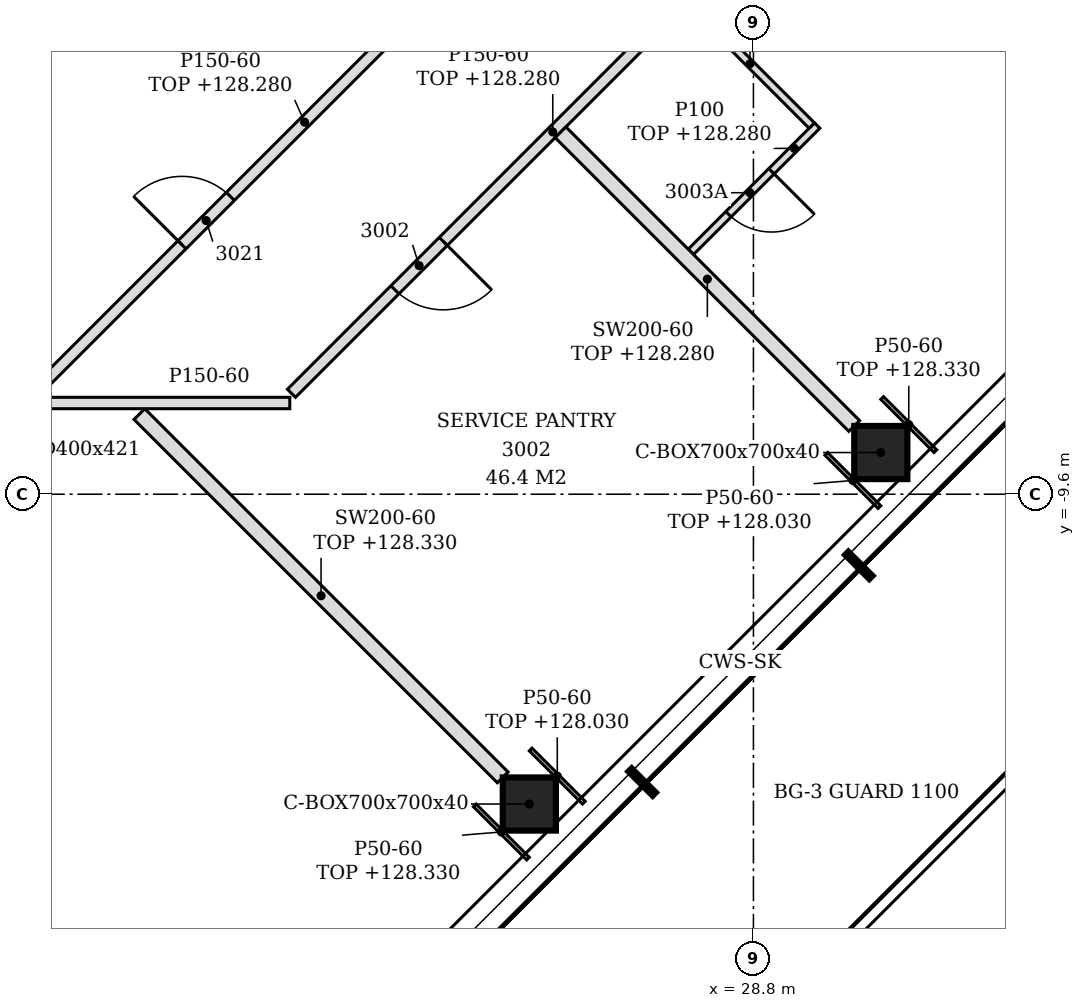
"""IFC4 building model, lengths in metres.
Left out: names, types, materials, properties, quantities, classifications, styles, units other than length and angle.
Written with IfcOpenShell. Run it as: python <this file> out.ifc"""

import sys

from ifc_helpers import new_model, si_unit, direction, frame, frame_2d, origin, origin_2d, place, context, subcontext, project, spatial, rectangle, hollow_rectangle, extrude, element, fill, save


model = new_model("IFC4")
c1 = context("Model", 3, precision=1e-05, world=origin(), true_north=direction((0.0, 1.0)))
c2 = subcontext(c1, "Body", "Model", "MODEL_VIEW")
j1 = project(units=[si_unit("LENGTHUNIT", "METRE"), si_unit("PLANEANGLEUNIT", "RADIAN")], contexts=[c1])
p1 = place(None, origin())
s1 = spatial("IfcSite", under=j1, at=p1, CompositionType="ELEMENT")
p2 = place(p1, origin())
s2 = spatial("IfcBuilding", under=s1, at=p2, CompositionType="ELEMENT")
p3 = place(p2, frame((0.0, 0.0, 125.4)))
s3 = spatial("IfcBuildingStorey", under=s2, at=p3, CompositionType="ELEMENT", Elevation=125.4)
for number, where, z_axis, x_axis in (
    (1, (25.852, -13.676, -0.15), (0.0, 0.0, 1.0), (1.0, 0.0, 0.0)),
    (2, (30.476, -9.052, -0.15), (0.0, 0.0, 1.0), (1.0, 0.0, 0.0)),
):
    element("IfcColumn", number, at=place(p3, frame(where, z_axis=z_axis, x_axis=x_axis)), inside=s3, PredefinedType="COLUMN", context=c2, shape_type="SweptSolid", body=[
        extrude(hollow_rectangle(XDim=0.7, YDim=0.7, WallThickness=0.04, at=origin_2d()), origin(), (0.0, 0.0, 1.0), 3.6),
    ])
p4 = place(p3, frame((25.502, -13.326, 0.0), z_axis=(0.0, 0.0, 1.0), x_axis=(-0.707106781187, 0.707106781187, 0.0)))
e3 = element("IfcWall", 3, at=p4, inside=s3, PredefinedType="PARTITIONING", context=c2, shape_type="SweptSolid", body=[
    extrude(rectangle(XDim=6.76, YDim=0.2, at=frame_2d((3.38, 0.0))), origin(), (0.0, 0.0, 1.0), 2.93),
])
p5 = place(p3, frame((30.125, -8.702, 0.0), z_axis=(0.0, 0.0, 1.0), x_axis=(-0.707084440093, 0.707129121574, 0.0)))
e4 = element("IfcWall", 4, at=p5, inside=s3, PredefinedType="PARTITIONING", context=c2, shape_type="SweptSolid", body=[
    extrude(rectangle(XDim=5.464, YDim=0.2, at=frame_2d((2.732, 0.0))), origin(), (0.0, 0.0, 1.0), 2.88),
])
p6 = place(p3, frame((19.405, -8.4, 0.0), z_axis=(0.0, 0.0, 1.0), x_axis=(1.0, 0.0, 0.0)))
e5 = element("IfcWall", 5, at=p6, inside=s3, PredefinedType="PARTITIONING", context=c2, shape_type="SweptSolid", body=[
    extrude(rectangle(XDim=3.295, YDim=0.15, at=frame_2d((1.648, 0.0))), origin(), (0.0, 0.0, 1.0), 3.45),
])
p7 = place(p3, frame((22.722, -8.272, 0.0), z_axis=(0.0, 0.0, 1.0), x_axis=(0.707124475887, 0.707089086043, 0.0)))
e6 = element("IfcWall", 6, at=p7, inside=s3, PredefinedType="PARTITIONING", context=c2, shape_type="SweptSolid", body=[
    extrude(rectangle(XDim=6.899, YDim=0.15, at=frame_2d((3.449, 0.0))), origin(), (0.0, 0.0, 1.0), 2.88),
])
p8 = place(p7, frame((1.925, 0.0, 0.0)))
e7 = element("IfcOpeningElement", 7, at=p8, cuts=e6, PredefinedType="OPENING", context=c2, shape_type="SweptSolid", body=[
    extrude(rectangle(XDim=0.9, YDim=2.1, at=frame_2d((0.45, 1.05))), frame((0.0, 0.085, 0.0), z_axis=(0.0, -1.0, 0.0), x_axis=(1.0, 0.0, 0.0)), (0.0, 0.0, 1.0), 0.17),
])
p9 = place(p3, frame((19.408, -8.191, 0.0), z_axis=(0.0, 0.0, 1.0), x_axis=(0.707126119272, 0.707087442572, 0.0)))
e8 = element("IfcWall", 8, at=p9, inside=s3, PredefinedType="PARTITIONING", context=c2, shape_type="SweptSolid", body=[
    extrude(rectangle(XDim=6.312, YDim=0.15, at=frame_2d((3.156, 0.0))), origin(), (0.0, 0.0, 1.0), 2.88),
])
p10 = place(p9, frame((2.649, 0.0, 0.0)))
e9 = element("IfcOpeningElement", 9, at=p10, cuts=e8, PredefinedType="OPENING", context=c2, shape_type="SweptSolid", body=[
    extrude(rectangle(XDim=0.9, YDim=2.1, at=frame_2d((0.45, 1.05))), frame((0.0, 0.085, 0.0), z_axis=(0.0, -1.0, 0.0), x_axis=(1.0, 0.0, 0.0)), (0.0, 0.0, 1.0), 0.17),
])
p11 = place(p3, frame((27.977, -6.411, 0.0), z_axis=(0.0, 0.0, 1.0), x_axis=(0.707054828152, 0.707158730404, 0.0)))
e10 = element("IfcWall", 10, at=p11, inside=s3, PredefinedType="PARTITIONING", context=c2, shape_type="SweptSolid", body=[
    extrude(rectangle(XDim=2.35, YDim=0.1, at=frame_2d((1.175, 0.0))), origin(), (0.0, 0.0, 1.0), 2.88),
])
p12 = place(p11, frame((0.7, 0.0, 0.0)))
e11 = element("IfcOpeningElement", 11, at=p12, cuts=e10, PredefinedType="OPENING", context=c2, shape_type="SweptSolid", body=[
    extrude(rectangle(XDim=0.8, YDim=2.1, at=frame_2d((0.4, 1.05))), frame((0.0, 0.06, 0.0), z_axis=(0.0, -1.0, 0.0), x_axis=(1.0, 0.0, 0.0)), (0.0, 0.0, 1.0), 0.12),
])
p13 = place(p3, frame((29.568, -4.75, 0.0), z_axis=(0.0, 0.0, 1.0), x_axis=(-0.707106781187, 0.707106781187, 0.0)))
e12 = element("IfcWall", 12, at=p13, inside=s3, PredefinedType="PARTITIONING", context=c2, shape_type="SweptSolid", body=[
    extrude(rectangle(XDim=2.3, YDim=0.1, at=frame_2d((1.15, 0.0))), origin(), (0.0, 0.0, 1.0), 2.88),
])
p14 = place(p3, frame((26.569, -13.658, 0.0), z_axis=(0.0, 0.0, 1.0), x_axis=(-0.707106781187, 0.707106781187, 0.0)))
e13 = element("IfcWall", 13, at=p14, inside=s3, PredefinedType="PARTITIONING", context=c2, shape_type="SweptSolid", body=[
    extrude(rectangle(XDim=0.99, YDim=0.05, at=frame_2d((0.495, 0.0))), origin(), (0.0, 0.0, 1.0), 2.63),
])
p15 = place(p3, frame((25.834, -14.393, 0.0), z_axis=(0.0, 0.0, 1.0), x_axis=(-0.707106781187, 0.707106781187, 0.0)))
e14 = element("IfcWall", 14, at=p15, inside=s3, PredefinedType="PARTITIONING", context=c2, shape_type="SweptSolid", body=[
    extrude(rectangle(XDim=0.99, YDim=0.05, at=frame_2d((0.495, 0.0))), origin(), (0.0, 0.0, 1.0), 2.93),
])
p16 = place(p3, frame((30.458, -9.769, 0.0), z_axis=(0.0, 0.0, 1.0), x_axis=(-0.706983473703, 0.707230067171, 0.0)))
e15 = element("IfcWall", 15, at=p16, inside=s3, PredefinedType="PARTITIONING", context=c2, shape_type="SweptSolid", body=[
    extrude(rectangle(XDim=0.99, YDim=0.05, at=frame_2d((0.495, 0.0))), origin(), (0.0, 0.0, 1.0), 2.63),
])
p17 = place(p3, frame((31.193, -9.034, 0.0), z_axis=(0.0, 0.0, 1.0), x_axis=(-0.707106781187, 0.707106781187, 0.0)))
e16 = element("IfcWall", 16, at=p17, inside=s3, PredefinedType="PARTITIONING", context=c2, shape_type="SweptSolid", body=[
    extrude(rectangle(XDim=0.99, YDim=0.05, at=frame_2d((0.495, 0.0))), origin(), (0.0, 0.0, 1.0), 2.93),
])
p18 = place(p8, frame((0.9, 0.0, 0.0), z_axis=(0.0, 0.0, 1.0), x_axis=(-1.0, 0.0, 0.0)))
e17 = element("IfcDoor", 17, at=p18, inside=s3, OperationType="SINGLE_SWING_LEFT", PredefinedType="DOOR", context=c2, shape_type="SweptSolid", body=[
    extrude(rectangle(XDim=0.9, YDim=2.1, at=frame_2d((0.45, 1.05))), frame((0.0, 0.025, 0.0), z_axis=(0.0, -1.0, 0.0), x_axis=(1.0, 0.0, 0.0)), (0.0, 0.0, 1.0), 0.05),
])
fill(e7, e17)
p19 = place(p12, frame((0.8, 0.0, 0.0), z_axis=(0.0, 0.0, 1.0), x_axis=(-1.0, 0.0, 0.0)))
e18 = element("IfcDoor", 18, at=p19, inside=s3, OperationType="SINGLE_SWING_LEFT", PredefinedType="DOOR", context=c2, shape_type="SweptSolid", body=[
    extrude(rectangle(XDim=0.8, YDim=2.1, at=frame_2d((0.4, 1.05))), frame((0.0, 0.025, 0.0), z_axis=(0.0, -1.0, 0.0), x_axis=(1.0, 0.0, 0.0)), (0.0, 0.0, 1.0), 0.05),
])
fill(e11, e18)
p20 = place(p10, origin())
e19 = element("IfcDoor", 19, at=p20, inside=s3, OperationType="SINGLE_SWING_LEFT", PredefinedType="DOOR", context=c2, shape_type="SweptSolid", body=[
    extrude(rectangle(XDim=0.9, YDim=2.1, at=frame_2d((0.45, 1.05))), frame((0.0, 0.025, 0.0), z_axis=(0.0, -1.0, 0.0), x_axis=(1.0, 0.0, 0.0)), (0.0, 0.0, 1.0), 0.05),
])
fill(e9, e19)
save(model, sys.argv[1])
